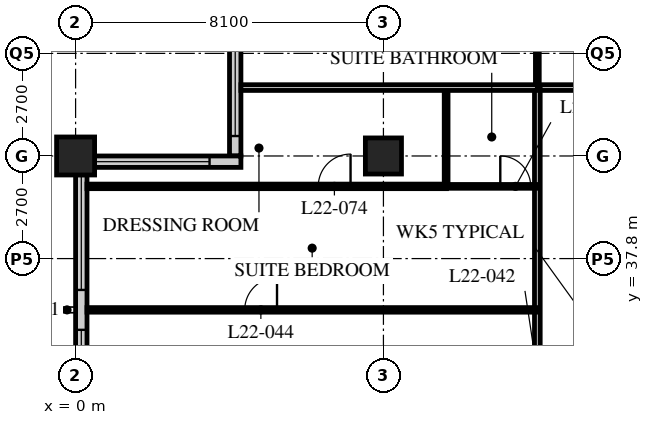
"""IFC4 building model, lengths in metres.
Left out: names, types, materials, properties, quantities, classifications, styles, units other than length and angle.
Written with IfcOpenShell. Run it as: python <this file> out.ifc"""

import sys

from ifc_helpers import new_model, si_unit, direction, frame, frame_2d, origin, origin_2d, place, context, subcontext, project, spatial, rectangle, hollow_rectangle, extrude, element, fill, save


model = new_model("IFC4")
c1 = context("Model", 3, precision=1e-05, world=origin(), true_north=direction((0.0, 1.0)))
c2 = subcontext(c1, "Body", "Model", "MODEL_VIEW")
j1 = project(units=[si_unit("LENGTHUNIT", "METRE"), si_unit("PLANEANGLEUNIT", "RADIAN")], contexts=[c1])
p1 = place(None, origin())
s1 = spatial("IfcSite", under=j1, at=p1, CompositionType="ELEMENT")
p2 = place(p1, origin())
s2 = spatial("IfcBuilding", under=s1, at=p2, CompositionType="ELEMENT")
p3 = place(p2, frame((0.0, 0.0, 87.4)))
s3 = spatial("IfcBuildingStorey", under=s2, at=p3, CompositionType="ELEMENT", Elevation=87.4)
p4 = place(p3, frame((0.0, 40.5, 0.0), z_axis=(0.0, 0.0, 1.0), x_axis=(1.0, 0.0, 0.0)))
e1 = element("IfcColumn", 1, at=p4, inside=s3, PredefinedType="COLUMN", context=c2, shape_type="SweptSolid", body=[
    extrude(hollow_rectangle(XDim=1.0, YDim=1.0, WallThickness=0.1, at=origin_2d()), origin(), (0.0, 0.0, 1.0), 3.4),
])
p5 = place(p3, frame((8.1, 40.5, 0.0), z_axis=(0.0, 0.0, 1.0), x_axis=(1.0, 0.0, 0.0)))
e2 = element("IfcColumn", 2, at=p5, inside=s3, PredefinedType="COLUMN", context=c2, shape_type="SweptSolid", body=[
    extrude(hollow_rectangle(XDim=0.95, YDim=0.95, WallThickness=0.095, at=origin_2d()), origin(), (0.0, 0.0, 1.0), 3.4),
])
p6 = place(p3, frame((4.2, 44.25, 0.0), z_axis=(0.0, 0.0, 1.0), x_axis=(0.0, -1.0, 0.0)))
e3 = element("IfcWall", 3, at=p6, inside=s3, PredefinedType="SOLIDWALL", context=c2, shape_type="SweptSolid", body=[
    extrude(rectangle(XDim=3.75, YDim=0.3, at=frame_2d((1.875, 0.0))), origin(), (0.0, 0.0, 1.0), 2.45),
])
p7 = place(p6, frame((0.225, 0.0, 0.9)))
e4 = element("IfcOpeningElement", 4, at=p7, cuts=e3, PredefinedType="OPENING", context=c2, shape_type="SweptSolid", body=[
    extrude(rectangle(XDim=3.0, YDim=1.1, at=frame_2d((1.5, 0.55))), frame((0.0, 0.16, 0.0), z_axis=(0.0, -1.0, 0.0), x_axis=(1.0, 0.0, 0.0)), (0.0, 0.0, 1.0), 0.32),
])
p8 = place(p3, frame((4.35, 40.35, 0.0), z_axis=(0.0, 0.0, 1.0), x_axis=(-1.0, 0.0, 0.0)))
e5 = element("IfcWall", 5, at=p8, inside=s3, PredefinedType="SOLIDWALL", context=c2, shape_type="SweptSolid", body=[
    extrude(rectangle(XDim=4.35, YDim=0.3, at=frame_2d((2.175, 0.0))), origin(), (0.0, 0.0, 1.0), 2.05),
])
p9 = place(p8, frame((0.825, 0.0, 0.9)))
e6 = element("IfcOpeningElement", 6, at=p9, cuts=e5, PredefinedType="OPENING", context=c2, shape_type="SweptSolid", body=[
    extrude(rectangle(XDim=3.0, YDim=1.1, at=frame_2d((1.5, 0.55))), frame((0.0, 0.16, 0.0), z_axis=(0.0, -1.0, 0.0), x_axis=(1.0, 0.0, 0.0)), (0.0, 0.0, 1.0), 0.32),
])
p10 = place(p3, frame((0.15, 40.2, 0.0), z_axis=(0.0, 0.0, 1.0), x_axis=(0.0, -1.0, 0.0)))
e7 = element("IfcWall", 7, at=p10, inside=s3, PredefinedType="SOLIDWALL", context=c2, shape_type="SweptSolid", body=[
    extrude(rectangle(XDim=32.1, YDim=0.3, at=frame_2d((16.05, 0.0))), origin(), (0.0, 0.0, 1.0), 2.05),
])
p11 = place(p10, frame((0.225, 0.0, 0.9)))
e8 = element("IfcOpeningElement", 8, at=p11, cuts=e7, PredefinedType="OPENING", context=c2, shape_type="SweptSolid", body=[
    extrude(rectangle(XDim=3.0, YDim=1.1, at=frame_2d((1.5, 0.55))), frame((0.0, 0.16, 0.0), z_axis=(0.0, -1.0, 0.0), x_axis=(1.0, 0.0, 0.0)), (0.0, 0.0, 1.0), 0.32),
])
p12 = place(p10, frame((4.275, 0.0, 0.9)))
e9 = element("IfcOpeningElement", 9, at=p12, cuts=e7, PredefinedType="OPENING", context=c2, shape_type="SweptSolid", body=[
    extrude(rectangle(XDim=3.0, YDim=1.1, at=frame_2d((1.5, 0.55))), frame((0.0, 0.16, 0.0), z_axis=(0.0, -1.0, 0.0), x_axis=(1.0, 0.0, 0.0)), (0.0, 0.0, 1.0), 0.32),
])
p13 = place(p10, frame((8.325, 0.0, 0.9)))
e10 = element("IfcOpeningElement", 10, at=p13, cuts=e7, PredefinedType="OPENING", context=c2, shape_type="SweptSolid", body=[
    extrude(rectangle(XDim=3.0, YDim=1.1, at=frame_2d((1.5, 0.55))), frame((0.0, 0.16, 0.0), z_axis=(0.0, -1.0, 0.0), x_axis=(1.0, 0.0, 0.0)), (0.0, 0.0, 1.0), 0.32),
])
p14 = place(p10, frame((12.375, 0.0, 0.9)))
e11 = element("IfcOpeningElement", 11, at=p14, cuts=e7, PredefinedType="OPENING", context=c2, shape_type="SweptSolid", body=[
    extrude(rectangle(XDim=3.0, YDim=1.1, at=frame_2d((1.5, 0.55))), frame((0.0, 0.16, 0.0), z_axis=(0.0, -1.0, 0.0), x_axis=(1.0, 0.0, 0.0)), (0.0, 0.0, 1.0), 0.32),
])
p15 = place(p10, frame((16.425, 0.0, 0.9)))
e12 = element("IfcOpeningElement", 12, at=p15, cuts=e7, PredefinedType="OPENING", context=c2, shape_type="SweptSolid", body=[
    extrude(rectangle(XDim=3.0, YDim=1.1, at=frame_2d((1.5, 0.55))), frame((0.0, 0.16, 0.0), z_axis=(0.0, -1.0, 0.0), x_axis=(1.0, 0.0, 0.0)), (0.0, 0.0, 1.0), 0.32),
])
p16 = place(p10, frame((20.475, 0.0, 0.9)))
e13 = element("IfcOpeningElement", 13, at=p16, cuts=e7, PredefinedType="OPENING", context=c2, shape_type="SweptSolid", body=[
    extrude(rectangle(XDim=3.0, YDim=1.1, at=frame_2d((1.5, 0.55))), frame((0.0, 0.16, 0.0), z_axis=(0.0, -1.0, 0.0), x_axis=(1.0, 0.0, 0.0)), (0.0, 0.0, 1.0), 0.32),
])
p17 = place(p10, frame((24.525, 0.0, 0.9)))
e14 = element("IfcOpeningElement", 14, at=p17, cuts=e7, PredefinedType="OPENING", context=c2, shape_type="SweptSolid", body=[
    extrude(rectangle(XDim=3.0, YDim=1.1, at=frame_2d((1.5, 0.55))), frame((0.0, 0.16, 0.0), z_axis=(0.0, -1.0, 0.0), x_axis=(1.0, 0.0, 0.0)), (0.0, 0.0, 1.0), 0.32),
])
p18 = place(p10, frame((28.575, 0.0, 0.9)))
e15 = element("IfcOpeningElement", 15, at=p18, cuts=e7, PredefinedType="OPENING", context=c2, shape_type="SweptSolid", body=[
    extrude(rectangle(XDim=3.0, YDim=1.1, at=frame_2d((1.5, 0.55))), frame((0.0, 0.16, 0.0), z_axis=(0.0, -1.0, 0.0), x_axis=(1.0, 0.0, 0.0)), (0.0, 0.0, 1.0), 0.32),
])
p19 = place(p3, frame((12.15, 42.3, 0.0), z_axis=(0.0, 0.0, 1.0), x_axis=(1.0, 0.0, 0.0)))
e16 = element("IfcWall", 16, at=p19, inside=s3, PredefinedType="PARTITIONING", context=c2, shape_type="SweptSolid", body=[
    extrude(rectangle(XDim=32.4, YDim=0.15, at=frame_2d((16.2, 0.0))), origin(), (0.0, 0.0, 1.0), 3.15),
])
p20 = place(p19, frame((5.95, 0.0, 0.0)))
e17 = element("IfcOpeningElement", 17, at=p20, cuts=e16, PredefinedType="OPENING", context=c2, shape_type="SweptSolid", body=[
    extrude(rectangle(XDim=1.0, YDim=2.1, at=frame_2d((0.5, 1.05))), frame((0.0, 0.085, 0.0), z_axis=(0.0, -1.0, 0.0), x_axis=(1.0, 0.0, 0.0)), (0.0, 0.0, 1.0), 0.17),
])
p21 = place(p19, frame((14.6, 0.0, 0.0)))
e18 = element("IfcOpeningElement", 18, at=p21, cuts=e16, PredefinedType="OPENING", context=c2, shape_type="SweptSolid", body=[
    extrude(rectangle(XDim=1.0, YDim=2.1, at=frame_2d((0.5, 1.05))), frame((0.0, 0.085, 0.0), z_axis=(0.0, -1.0, 0.0), x_axis=(1.0, 0.0, 0.0)), (0.0, 0.0, 1.0), 0.17),
])
p22 = place(p19, frame((18.65, 0.0, 0.0)))
e19 = element("IfcOpeningElement", 19, at=p22, cuts=e16, PredefinedType="OPENING", context=c2, shape_type="SweptSolid", body=[
    extrude(rectangle(XDim=1.0, YDim=2.1, at=frame_2d((0.5, 1.05))), frame((0.0, 0.085, 0.0), z_axis=(0.0, -1.0, 0.0), x_axis=(1.0, 0.0, 0.0)), (0.0, 0.0, 1.0), 0.17),
])
p23 = place(p19, frame((22.15, 0.0, 0.0)))
e20 = element("IfcOpeningElement", 20, at=p23, cuts=e16, PredefinedType="OPENING", context=c2, shape_type="SweptSolid", body=[
    extrude(rectangle(XDim=1.0, YDim=2.1, at=frame_2d((0.5, 1.05))), frame((0.0, 0.085, 0.0), z_axis=(0.0, -1.0, 0.0), x_axis=(1.0, 0.0, 0.0)), (0.0, 0.0, 1.0), 0.17),
])
p24 = place(p19, frame((29.025, 0.0, 0.0)))
e21 = element("IfcOpeningElement", 21, at=p24, cuts=e16, PredefinedType="OPENING", context=c2, shape_type="SweptSolid", body=[
    extrude(rectangle(XDim=1.0, YDim=2.1, at=frame_2d((0.5, 1.05))), frame((0.0, 0.085, 0.0), z_axis=(0.0, -1.0, 0.0), x_axis=(1.0, 0.0, 0.0)), (0.0, 0.0, 1.0), 0.17),
])
p25 = place(p19, frame((2.375, 0.0, 0.0)))
e22 = element("IfcOpeningElement", 22, at=p25, cuts=e16, PredefinedType="OPENING", context=c2, shape_type="SweptSolid", body=[
    extrude(rectangle(XDim=1.0, YDim=2.1, at=frame_2d((0.5, 1.05))), frame((0.0, 0.085, 0.0), z_axis=(0.0, -1.0, 0.0), x_axis=(1.0, 0.0, 0.0)), (0.0, 0.0, 1.0), 0.17),
])
p26 = place(p3, frame((12.15, 16.2, 0.0), z_axis=(0.0, 0.0, 1.0), x_axis=(0.0, 1.0, 0.0)))
e23 = element("IfcWall", 23, at=p26, inside=s3, PredefinedType="PARTITIONING", context=c2, shape_type="SweptSolid", body=[
    extrude(rectangle(XDim=26.1, YDim=0.15, at=frame_2d((13.05, 0.0))), origin(), (0.0, 0.0, 1.0), 3.15),
])
p27 = place(p26, frame((2.45, 0.0, 0.0)))
e24 = element("IfcOpeningElement", 24, at=p27, cuts=e23, PredefinedType="OPENING", context=c2, shape_type="SweptSolid", body=[
    extrude(rectangle(XDim=1.0, YDim=2.1, at=frame_2d((0.5, 1.05))), frame((0.0, 0.085, 0.0), z_axis=(0.0, -1.0, 0.0), x_axis=(1.0, 0.0, 0.0)), (0.0, 0.0, 1.0), 0.17),
])
p28 = place(p26, frame((6.5, 0.0, 0.0)))
e25 = element("IfcOpeningElement", 25, at=p28, cuts=e23, PredefinedType="OPENING", context=c2, shape_type="SweptSolid", body=[
    extrude(rectangle(XDim=1.0, YDim=2.1, at=frame_2d((0.5, 1.05))), frame((0.0, 0.085, 0.0), z_axis=(0.0, -1.0, 0.0), x_axis=(1.0, 0.0, 0.0)), (0.0, 0.0, 1.0), 0.17),
])
p29 = place(p26, frame((10.0, 0.0, 0.0)))
e26 = element("IfcOpeningElement", 26, at=p29, cuts=e23, PredefinedType="OPENING", context=c2, shape_type="SweptSolid", body=[
    extrude(rectangle(XDim=1.0, YDim=2.1, at=frame_2d((0.5, 1.05))), frame((0.0, 0.085, 0.0), z_axis=(0.0, -1.0, 0.0), x_axis=(1.0, 0.0, 0.0)), (0.0, 0.0, 1.0), 0.17),
])
p30 = place(p26, frame((18.1, 0.0, 0.0)))
e27 = element("IfcOpeningElement", 27, at=p30, cuts=e23, PredefinedType="OPENING", context=c2, shape_type="SweptSolid", body=[
    extrude(rectangle(XDim=1.0, YDim=2.1, at=frame_2d((0.5, 1.05))), frame((0.0, 0.085, 0.0), z_axis=(0.0, -1.0, 0.0), x_axis=(1.0, 0.0, 0.0)), (0.0, 0.0, 1.0), 0.17),
])
p31 = place(p3, frame((9.75, 39.7, 0.0), z_axis=(0.0, 0.0, 1.0), x_axis=(0.0, 1.0, 0.0)))
e28 = element("IfcWall", 28, at=p31, inside=s3, PredefinedType="PARTITIONING", context=c2, shape_type="SweptSolid", body=[
    extrude(rectangle(XDim=2.6, YDim=0.1, at=frame_2d((1.3, 0.0))), origin(), (0.0, 0.0, 1.0), 3.15),
])
p32 = place(p3, frame((12.15, 39.7, 0.0), z_axis=(0.0, 0.0, 1.0), x_axis=(-1.0, 0.0, 0.0)))
e29 = element("IfcWall", 29, at=p32, inside=s3, PredefinedType="PARTITIONING", context=c2, shape_type="SweptSolid", body=[
    extrude(rectangle(XDim=2.4, YDim=0.1, at=frame_2d((1.2, 0.0))), origin(), (0.0, 0.0, 1.0), 3.15),
])
p33 = place(p32, frame((0.175, 0.0, 0.0)))
e30 = element("IfcOpeningElement", 30, at=p33, cuts=e29, PredefinedType="OPENING", context=c2, shape_type="SweptSolid", body=[
    extrude(rectangle(XDim=0.8, YDim=2.1, at=frame_2d((0.4, 1.05))), frame((0.0, 0.06, 0.0), z_axis=(0.0, -1.0, 0.0), x_axis=(1.0, 0.0, 0.0)), (0.0, 0.0, 1.0), 0.12),
])
p34 = place(p3, frame((12.15, 36.45, 0.0), z_axis=(0.0, 0.0, 1.0), x_axis=(-1.0, 0.0, 0.0)))
e31 = element("IfcWall", 31, at=p34, inside=s3, PredefinedType="PARTITIONING", context=c2, shape_type="SweptSolid", body=[
    extrude(rectangle(XDim=11.85, YDim=0.12, at=frame_2d((5.925, 0.0))), origin(), (0.0, 0.0, 1.0), 3.15),
])
p35 = place(p34, frame((6.85, 0.0, 0.0)))
e32 = element("IfcOpeningElement", 32, at=p35, cuts=e31, PredefinedType="OPENING", context=c2, shape_type="SweptSolid", body=[
    extrude(rectangle(XDim=0.85, YDim=2.1, at=frame_2d((0.425, 1.05))), frame((0.0, 0.07, 0.0), z_axis=(0.0, -1.0, 0.0), x_axis=(1.0, 0.0, 0.0)), (0.0, 0.0, 1.0), 0.14),
])
p36 = place(p3, frame((12.15, 42.3, 0.0), z_axis=(0.0, 0.0, 1.0), x_axis=(0.0, 1.0, 0.0)))
e33 = element("IfcWall", 33, at=p36, inside=s3, PredefinedType="PARTITIONING", context=c2, shape_type="SweptSolid", body=[
    extrude(rectangle(XDim=2.4, YDim=0.1, at=frame_2d((1.2, 0.0))), origin(), (0.0, 0.0, 1.0), 3.15),
])
p37 = place(p3, frame((4.35, 42.3, 0.0), z_axis=(0.0, 0.0, 1.0), x_axis=(1.0, 0.0, 0.0)))
e34 = element("IfcWall", 34, at=p37, inside=s3, PredefinedType="PARTITIONING", context=c2, shape_type="SweptSolid", body=[
    extrude(rectangle(XDim=7.8, YDim=0.15, at=frame_2d((3.9, 0.0))), origin(), (0.0, 0.0, 1.0), 3.15),
])
p38 = place(p3, frame((9.76, 39.7, 0.0), z_axis=(0.0, 0.0, 1.0), x_axis=(-1.0, 0.0, 0.0)))
e35 = element("IfcWall", 35, at=p38, inside=s3, PredefinedType="PARTITIONING", context=c2, shape_type="SweptSolid", body=[
    extrude(rectangle(XDim=9.46, YDim=0.12, at=frame_2d((4.73, 0.0))), origin(), (0.0, 0.0, 1.0), 3.15),
])
p39 = place(p38, frame((2.525, 0.0, 0.0)))
e36 = element("IfcOpeningElement", 36, at=p39, cuts=e35, PredefinedType="OPENING", context=c2, shape_type="SweptSolid", body=[
    extrude(rectangle(XDim=0.85, YDim=2.0, at=frame_2d((0.425, 1.0))), frame((0.0, 0.07, 0.0), z_axis=(0.0, -1.0, 0.0), x_axis=(1.0, 0.0, 0.0)), (0.0, 0.0, 1.0), 0.14),
])
p40 = place(p7, origin())
e37 = element("IfcWindow", 37, at=p40, inside=s3, PartitioningType="SINGLE_PANEL", PredefinedType="WINDOW", context=c2, shape_type="SweptSolid", body=[
    extrude(rectangle(XDim=3.0, YDim=1.1, at=frame_2d((1.5, 0.55))), frame((0.0, 0.03, 0.0), z_axis=(0.0, -1.0, 0.0), x_axis=(1.0, 0.0, 0.0)), (0.0, 0.0, 1.0), 0.06),
])
fill(e4, e37)
p41 = place(p9, origin())
e38 = element("IfcWindow", 38, at=p41, inside=s3, PartitioningType="SINGLE_PANEL", PredefinedType="WINDOW", context=c2, shape_type="SweptSolid", body=[
    extrude(rectangle(XDim=3.0, YDim=1.1, at=frame_2d((1.5, 0.55))), frame((0.0, 0.03, 0.0), z_axis=(0.0, -1.0, 0.0), x_axis=(1.0, 0.0, 0.0)), (0.0, 0.0, 1.0), 0.06),
])
fill(e6, e38)
p42 = place(p11, origin())
e39 = element("IfcWindow", 39, at=p42, inside=s3, PartitioningType="SINGLE_PANEL", PredefinedType="WINDOW", context=c2, shape_type="SweptSolid", body=[
    extrude(rectangle(XDim=3.0, YDim=1.1, at=frame_2d((1.5, 0.55))), frame((0.0, 0.03, 0.0), z_axis=(0.0, -1.0, 0.0), x_axis=(1.0, 0.0, 0.0)), (0.0, 0.0, 1.0), 0.06),
])
fill(e8, e39)
p43 = place(p12, origin())
e40 = element("IfcWindow", 40, at=p43, inside=s3, PartitioningType="SINGLE_PANEL", PredefinedType="WINDOW", context=c2, shape_type="SweptSolid", body=[
    extrude(rectangle(XDim=3.0, YDim=1.1, at=frame_2d((1.5, 0.55))), frame((0.0, 0.03, 0.0), z_axis=(0.0, -1.0, 0.0), x_axis=(1.0, 0.0, 0.0)), (0.0, 0.0, 1.0), 0.06),
])
fill(e9, e40)
p44 = place(p33, origin())
e41 = element("IfcDoor", 41, at=p44, inside=s3, OperationType="SINGLE_SWING_LEFT", PredefinedType="DOOR", context=c2, shape_type="SweptSolid", body=[
    extrude(rectangle(XDim=0.8, YDim=2.1, at=frame_2d((0.4, 1.05))), frame((0.0, 0.025, 0.0), z_axis=(0.0, -1.0, 0.0), x_axis=(1.0, 0.0, 0.0)), (0.0, 0.0, 1.0), 0.05),
])
fill(e30, e41)
p45 = place(p35, origin())
e42 = element("IfcDoor", 42, at=p45, inside=s3, OperationType="SINGLE_SWING_RIGHT", PredefinedType="DOOR", context=c2, shape_type="SweptSolid", body=[
    extrude(rectangle(XDim=0.85, YDim=2.1, at=frame_2d((0.425, 1.05))), frame((0.0, 0.025, 0.0), z_axis=(0.0, -1.0, 0.0), x_axis=(1.0, 0.0, 0.0)), (0.0, 0.0, 1.0), 0.05),
])
fill(e32, e42)
p46 = place(p39, origin())
e43 = element("IfcDoor", 43, at=p46, inside=s3, OperationType="SINGLE_SWING_RIGHT", PredefinedType="DOOR", context=c2, shape_type="SweptSolid", body=[
    extrude(rectangle(XDim=0.85, YDim=2.0, at=frame_2d((0.425, 1.0))), frame((0.0, 0.025, 0.0), z_axis=(0.0, -1.0, 0.0), x_axis=(1.0, 0.0, 0.0)), (0.0, 0.0, 1.0), 0.05),
])
fill(e36, e43)
save(model, sys.argv[1])
